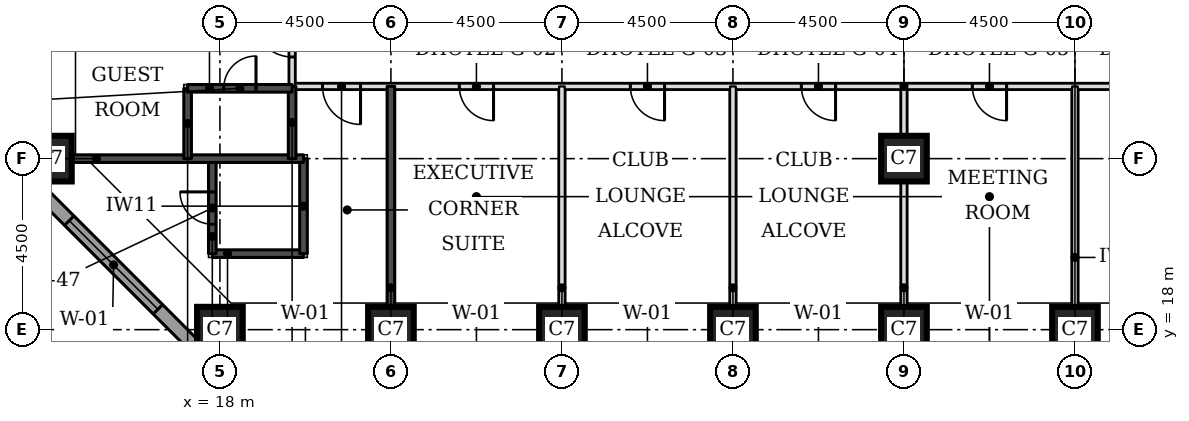
"""IFC4 building model, lengths in metres.
Left out: names, types, materials, properties, quantities, classifications, styles, units other than length and angle.
Written with IfcOpenShell. Run it as: python <this file> out.ifc"""

import sys

from ifc_helpers import new_model, si_unit, direction, frame, frame_2d, origin, origin_2d, place, context, subcontext, project, spatial, rectangle, extrude, element, fill, save


model = new_model("IFC4")
c1 = context("Model", 3, precision=1e-05, world=origin(), true_north=direction((0.0, 1.0)))
c2 = subcontext(c1, "Body", "Model", "MODEL_VIEW")
j1 = project(units=[si_unit("LENGTHUNIT", "METRE"), si_unit("PLANEANGLEUNIT", "RADIAN")], contexts=[c1])
p1 = place(None, origin())
s1 = spatial("IfcSite", under=j1, at=p1, CompositionType="ELEMENT")
p2 = place(p1, origin())
s2 = spatial("IfcBuilding", under=s1, at=p2, CompositionType="ELEMENT")
p3 = place(p2, frame((0.0, 0.0, 66.0)))
s3 = spatial("IfcBuildingStorey", under=s2, at=p3, CompositionType="ELEMENT", Elevation=66.0)
for number, where, z_axis, x_axis in (
    (1, (18.0, 18.0, 0.0), (0.0, 0.0, 1.0), (1.0, 0.0, 0.0)),
    (2, (22.5, 18.0, 0.0), (0.0, 0.0, 1.0), (1.0, 0.0, 0.0)),
    (3, (27.0, 18.0, 0.0), (0.0, 0.0, 1.0), (1.0, 0.0, 0.0)),
    (4, (31.5, 18.0, 0.0), (0.0, 0.0, 1.0), (1.0, 0.0, 0.0)),
    (5, (36.0, 18.0, 0.0), (0.0, 0.0, 1.0), (1.0, 0.0, 0.0)),
    (6, (40.5, 18.0, 0.0), (0.0, 0.0, 1.0), (1.0, 0.0, 0.0)),
    (7, (13.5, 22.5, 0.0), (0.0, 0.0, 1.0), (1.0, 0.0, 0.0)),
    (8, (36.0, 22.5, 0.0), (0.0, 0.0, 1.0), (1.0, 0.0, 0.0)),
):
    element("IfcColumn", number, at=place(p3, frame(where, z_axis=z_axis, x_axis=x_axis)), inside=s3, PredefinedType="COLUMN", context=c2, shape_type="SweptSolid", body=[
        extrude(rectangle(XDim=1.2, YDim=1.2, at=origin_2d()), origin(), (0.0, 0.0, 1.0), 3.3),
    ])
p4 = place(p3, frame((12.674, 22.23, 0.0), z_axis=(0.0, 0.0, 1.0), x_axis=(0.707106781187, -0.707106781187, 0.0)))
e9 = element("IfcWall", 9, at=p4, inside=s3, PredefinedType="STANDARD", context=c2, shape_type="SweptSolid", body=[
    extrude(rectangle(XDim=7.151, YDim=0.35, at=frame_2d((3.576, 0.0))), origin(), (0.0, 0.0, 1.0), 3.055),
])
p5 = place(p4, frame((1.926, 0.0, 0.8)))
e10 = element("IfcOpeningElement", 10, at=p5, cuts=e9, PredefinedType="OPENING", context=c2, shape_type="SweptSolid", body=[
    extrude(rectangle(XDim=3.3, YDim=1.5, at=frame_2d((1.65, 0.75))), frame((0.0, 0.185, 0.0), z_axis=(0.0, -1.0, 0.0), x_axis=(1.0, 0.0, 0.0)), (0.0, 0.0, 1.0), 0.37),
])
p6 = place(p3, frame((19.9, 24.4, 0.0), z_axis=(0.0, 0.0, 1.0), x_axis=(1.0, 0.0, 0.0)))
e11 = element("IfcWall", 11, at=p6, inside=s3, PredefinedType="PARTITIONING", context=c2, shape_type="SweptSolid", body=[
    extrude(rectangle(XDim=32.2, YDim=0.15, at=frame_2d((16.1, 0.0))), origin(), (0.0, 0.0, 1.0), 3.08),
])
p7 = place(p6, frame((4.4, 0.0, 0.0)))
e12 = element("IfcOpeningElement", 12, at=p7, cuts=e11, PredefinedType="OPENING", context=c2, shape_type="SweptSolid", body=[
    extrude(rectangle(XDim=0.9, YDim=2.1, at=frame_2d((0.45, 1.05))), frame((0.0, 0.085, 0.0), z_axis=(0.0, -1.0, 0.0), x_axis=(1.0, 0.0, 0.0)), (0.0, 0.0, 1.0), 0.17),
])
p8 = place(p6, frame((8.9, 0.0, 0.0)))
e13 = element("IfcOpeningElement", 13, at=p8, cuts=e11, PredefinedType="OPENING", context=c2, shape_type="SweptSolid", body=[
    extrude(rectangle(XDim=0.9, YDim=2.1, at=frame_2d((0.45, 1.05))), frame((0.0, 0.085, 0.0), z_axis=(0.0, -1.0, 0.0), x_axis=(1.0, 0.0, 0.0)), (0.0, 0.0, 1.0), 0.17),
])
p9 = place(p6, frame((13.4, 0.0, 0.0)))
e14 = element("IfcOpeningElement", 14, at=p9, cuts=e11, PredefinedType="OPENING", context=c2, shape_type="SweptSolid", body=[
    extrude(rectangle(XDim=0.9, YDim=2.1, at=frame_2d((0.45, 1.05))), frame((0.0, 0.085, 0.0), z_axis=(0.0, -1.0, 0.0), x_axis=(1.0, 0.0, 0.0)), (0.0, 0.0, 1.0), 0.17),
])
p10 = place(p6, frame((17.9, 0.0, 0.0)))
e15 = element("IfcOpeningElement", 15, at=p10, cuts=e11, PredefinedType="OPENING", context=c2, shape_type="SweptSolid", body=[
    extrude(rectangle(XDim=0.9, YDim=2.1, at=frame_2d((0.45, 1.05))), frame((0.0, 0.085, 0.0), z_axis=(0.0, -1.0, 0.0), x_axis=(1.0, 0.0, 0.0)), (0.0, 0.0, 1.0), 0.17),
])
p11 = place(p6, frame((22.4, 0.0, 0.0)))
e16 = element("IfcOpeningElement", 16, at=p11, cuts=e11, PredefinedType="OPENING", context=c2, shape_type="SweptSolid", body=[
    extrude(rectangle(XDim=0.9, YDim=2.1, at=frame_2d((0.45, 1.05))), frame((0.0, 0.085, 0.0), z_axis=(0.0, -1.0, 0.0), x_axis=(1.0, 0.0, 0.0)), (0.0, 0.0, 1.0), 0.17),
])
p12 = place(p6, frame((26.9, 0.0, 0.0)))
e17 = element("IfcOpeningElement", 17, at=p12, cuts=e11, PredefinedType="OPENING", context=c2, shape_type="SweptSolid", body=[
    extrude(rectangle(XDim=0.9, YDim=2.1, at=frame_2d((0.45, 1.05))), frame((0.0, 0.085, 0.0), z_axis=(0.0, -1.0, 0.0), x_axis=(1.0, 0.0, 0.0)), (0.0, 0.0, 1.0), 0.17),
])
p13 = place(p6, frame((0.8, 0.0, 0.0)))
e18 = element("IfcOpeningElement", 18, at=p13, cuts=e11, PredefinedType="OPENING", context=c2, shape_type="SweptSolid", body=[
    extrude(rectangle(XDim=1.0, YDim=2.1, at=frame_2d((0.5, 1.05))), frame((0.0, 0.085, 0.0), z_axis=(0.0, -1.0, 0.0), x_axis=(1.0, 0.0, 0.0)), (0.0, 0.0, 1.0), 0.17),
])
p14 = place(p6, frame((30.4, 0.0, 0.0)))
e19 = element("IfcOpeningElement", 19, at=p14, cuts=e11, PredefinedType="OPENING", context=c2, shape_type="SweptSolid", body=[
    extrude(rectangle(XDim=1.0, YDim=2.1, at=frame_2d((0.5, 1.05))), frame((0.0, 0.085, 0.0), z_axis=(0.0, -1.0, 0.0), x_axis=(1.0, 0.0, 0.0)), (0.0, 0.0, 1.0), 0.17),
])
p15 = place(p3, frame((19.9, 24.4, 0.0), z_axis=(0.0, 0.0, 1.0), x_axis=(0.0, 1.0, 0.0)))
e20 = element("IfcWall", 20, at=p15, inside=s3, PredefinedType="PARTITIONING", context=c2, shape_type="SweptSolid", body=[
    extrude(rectangle(XDim=25.1, YDim=0.15, at=frame_2d((12.55, 0.0))), origin(), (0.0, 0.0, 1.0), 3.08),
])
p16 = place(p15, frame((0.775, 0.0, 0.0)))
e21 = element("IfcOpeningElement", 21, at=p16, cuts=e20, PredefinedType="OPENING", context=c2, shape_type="SweptSolid", body=[
    extrude(rectangle(XDim=1.0, YDim=2.1, at=frame_2d((0.5, 1.05))), frame((0.0, 0.085, 0.0), z_axis=(0.0, -1.0, 0.0), x_axis=(1.0, 0.0, 0.0)), (0.0, 0.0, 1.0), 0.17),
])
p17 = place(p15, frame((3.175, 0.0, 0.0)))
e22 = element("IfcOpeningElement", 22, at=p17, cuts=e20, PredefinedType="OPENING", context=c2, shape_type="SweptSolid", body=[
    extrude(rectangle(XDim=1.0, YDim=2.1, at=frame_2d((0.5, 1.05))), frame((0.0, 0.085, 0.0), z_axis=(0.0, -1.0, 0.0), x_axis=(1.0, 0.0, 0.0)), (0.0, 0.0, 1.0), 0.17),
])
p18 = place(p15, frame((9.775, 0.0, 0.0)))
e23 = element("IfcOpeningElement", 23, at=p18, cuts=e20, PredefinedType="OPENING", context=c2, shape_type="SweptSolid", body=[
    extrude(rectangle(XDim=1.0, YDim=2.1, at=frame_2d((0.5, 1.05))), frame((0.0, 0.085, 0.0), z_axis=(0.0, -1.0, 0.0), x_axis=(1.0, 0.0, 0.0)), (0.0, 0.0, 1.0), 0.17),
])
p19 = place(p15, frame((12.175, 0.0, 0.0)))
e24 = element("IfcOpeningElement", 24, at=p19, cuts=e20, PredefinedType="OPENING", context=c2, shape_type="SweptSolid", body=[
    extrude(rectangle(XDim=1.0, YDim=2.1, at=frame_2d((0.5, 1.05))), frame((0.0, 0.085, 0.0), z_axis=(0.0, -1.0, 0.0), x_axis=(1.0, 0.0, 0.0)), (0.0, 0.0, 1.0), 0.17),
])
p20 = place(p15, frame((18.775, 0.0, 0.0)))
e25 = element("IfcOpeningElement", 25, at=p20, cuts=e20, PredefinedType="OPENING", context=c2, shape_type="SweptSolid", body=[
    extrude(rectangle(XDim=1.0, YDim=2.1, at=frame_2d((0.5, 1.05))), frame((0.0, 0.085, 0.0), z_axis=(0.0, -1.0, 0.0), x_axis=(1.0, 0.0, 0.0)), (0.0, 0.0, 1.0), 0.17),
])
p21 = place(p15, frame((21.175, 0.0, 0.0)))
e26 = element("IfcOpeningElement", 26, at=p21, cuts=e20, PredefinedType="OPENING", context=c2, shape_type="SweptSolid", body=[
    extrude(rectangle(XDim=1.0, YDim=2.1, at=frame_2d((0.5, 1.05))), frame((0.0, 0.085, 0.0), z_axis=(0.0, -1.0, 0.0), x_axis=(1.0, 0.0, 0.0)), (0.0, 0.0, 1.0), 0.17),
])
p22 = place(p3, frame((22.5, 18.6, 0.0), z_axis=(0.0, 0.0, 1.0), x_axis=(0.0, 1.0, 0.0)))
e27 = element("IfcWall", 27, at=p22, inside=s3, PredefinedType="SOLIDWALL", context=c2, shape_type="SweptSolid", body=[
    extrude(rectangle(XDim=5.8, YDim=0.2, at=frame_2d((2.9, 0.0))), origin(), (0.0, 0.0, 1.0), 3.08),
])
p23 = place(p3, frame((17.8, 20.0, 0.0), z_axis=(0.0, 0.0, 1.0), x_axis=(1.0, 0.0, 0.0)))
e28 = element("IfcWall", 28, at=p23, inside=s3, PredefinedType="SOLIDWALL", context=c2, shape_type="SweptSolid", body=[
    extrude(rectangle(XDim=2.4, YDim=0.2, at=frame_2d((1.2, 0.0))), origin(), (0.0, 0.0, 1.0), 3.08),
])
p24 = place(p3, frame((17.8, 20.0, 0.0), z_axis=(0.0, 0.0, 1.0), x_axis=(0.0, 1.0, 0.0)))
e29 = element("IfcWall", 29, at=p24, inside=s3, PredefinedType="SOLIDWALL", context=c2, shape_type="SweptSolid", body=[
    extrude(rectangle(XDim=2.5, YDim=0.2, at=frame_2d((1.25, 0.0))), origin(), (0.0, 0.0, 1.0), 3.08),
])
p25 = place(p24, frame((0.775, 0.0, 0.0)))
e30 = element("IfcOpeningElement", 30, at=p25, cuts=e29, PredefinedType="OPENING", context=c2, shape_type="SweptSolid", body=[
    extrude(rectangle(XDim=0.85, YDim=2.1, at=frame_2d((0.425, 1.05))), frame((0.0, 0.11, 0.0), z_axis=(0.0, -1.0, 0.0), x_axis=(1.0, 0.0, 0.0)), (0.0, 0.0, 1.0), 0.22),
])
p26 = place(p3, frame((20.2, 20.0, 0.0), z_axis=(0.0, 0.0, 1.0), x_axis=(0.0, 1.0, 0.0)))
e31 = element("IfcWall", 31, at=p26, inside=s3, PredefinedType="SOLIDWALL", context=c2, shape_type="SweptSolid", body=[
    extrude(rectangle(XDim=2.5, YDim=0.2, at=frame_2d((1.25, 0.0))), origin(), (0.0, 0.0, 1.0), 3.08),
])
p27 = place(p3, frame((14.1, 22.5, 0.0), z_axis=(0.0, 0.0, 1.0), x_axis=(1.0, 0.0, 0.0)))
e32 = element("IfcWall", 32, at=p27, inside=s3, PredefinedType="SOLIDWALL", context=c2, shape_type="SweptSolid", body=[
    extrude(rectangle(XDim=6.1, YDim=0.2, at=frame_2d((3.05, 0.0))), origin(), (0.0, 0.0, 1.0), 3.08),
])
p28 = place(p3, frame((17.15, 22.5, 0.0), z_axis=(0.0, 0.0, 1.0), x_axis=(0.0, 1.0, 0.0)))
e33 = element("IfcWall", 33, at=p28, inside=s3, PredefinedType="SOLIDWALL", context=c2, shape_type="SweptSolid", body=[
    extrude(rectangle(XDim=1.85, YDim=0.2, at=frame_2d((0.925, 0.0))), origin(), (0.0, 0.0, 1.0), 3.08),
])
p29 = place(p3, frame((19.9, 22.5, 0.0), z_axis=(0.0, 0.0, 1.0), x_axis=(0.0, 1.0, 0.0)))
e34 = element("IfcWall", 34, at=p29, inside=s3, PredefinedType="SOLIDWALL", context=c2, shape_type="SweptSolid", body=[
    extrude(rectangle(XDim=1.9, YDim=0.2, at=frame_2d((0.95, 0.0))), origin(), (0.0, 0.0, 1.0), 3.08),
])
p30 = place(p3, frame((17.15, 24.35, 0.0), z_axis=(0.0, 0.0, 1.0), x_axis=(1.0, 0.0, 0.0)))
e35 = element("IfcWall", 35, at=p30, inside=s3, PredefinedType="SOLIDWALL", context=c2, shape_type="SweptSolid", body=[
    extrude(rectangle(XDim=2.75, YDim=0.2, at=frame_2d((1.375, 0.0))), origin(), (0.0, 0.0, 1.0), 3.08),
])
p31 = place(p30, frame((0.95, 0.0, 0.0)))
e36 = element("IfcOpeningElement", 36, at=p31, cuts=e35, PredefinedType="OPENING", context=c2, shape_type="SweptSolid", body=[
    extrude(rectangle(XDim=0.85, YDim=2.1, at=frame_2d((0.425, 1.05))), frame((0.0, 0.11, 0.0), z_axis=(0.0, -1.0, 0.0), x_axis=(1.0, 0.0, 0.0)), (0.0, 0.0, 1.0), 0.22),
])
for number, where, z_axis, x_axis in (
    (37, (27.0, 18.6, 0.0), (0.0, 0.0, 1.0), (0.0, 1.0, 0.0)),
    (38, (31.5, 18.6, 0.0), (0.0, 0.0, 1.0), (0.0, 1.0, 0.0)),
):
    element("IfcWall", number, at=place(p3, frame(where, z_axis=z_axis, x_axis=x_axis)), inside=s3, PredefinedType="PARTITIONING", context=c2, shape_type="SweptSolid", body=[
        extrude(rectangle(XDim=5.8, YDim=0.15, at=frame_2d((2.9, 0.0))), origin(), (0.0, 0.0, 1.0), 3.08),
    ])
p32 = place(p3, frame((36.0, 18.6, 0.0), z_axis=(0.0, 0.0, 1.0), x_axis=(0.0, 1.0, 0.0)))
e39 = element("IfcWall", 39, at=p32, inside=s3, PredefinedType="PARTITIONING", context=c2, shape_type="SweptSolid", body=[
    extrude(rectangle(XDim=5.8, YDim=0.15, at=frame_2d((2.9, 0.0))), origin(), (0.0, 0.0, 1.0), 2.33),
])
p33 = place(p3, frame((40.5, 18.6, 0.0), z_axis=(0.0, 0.0, 1.0), x_axis=(0.0, 1.0, 0.0)))
e40 = element("IfcWall", 40, at=p33, inside=s3, PredefinedType="PARTITIONING", context=c2, shape_type="SweptSolid", body=[
    extrude(rectangle(XDim=5.8, YDim=0.15, at=frame_2d((2.9, 0.0))), origin(), (0.0, 0.0, 1.0), 3.08),
])
p34 = place(p5, origin())
e41 = element("IfcWindow", 41, at=p34, inside=s3, PartitioningType="SINGLE_PANEL", PredefinedType="WINDOW", context=c2, shape_type="SweptSolid", body=[
    extrude(rectangle(XDim=3.3, YDim=1.5, at=frame_2d((1.65, 0.75))), frame((0.0, 0.085, 0.0), z_axis=(0.0, -1.0, 0.0), x_axis=(1.0, 0.0, 0.0)), (0.0, 0.0, 1.0), 0.06),
])
fill(e10, e41)
p35 = place(p7, frame((0.9, 0.0, 0.0), z_axis=(0.0, 0.0, 1.0), x_axis=(-1.0, 0.0, 0.0)))
e42 = element("IfcDoor", 42, at=p35, inside=s3, OperationType="SINGLE_SWING_LEFT", PredefinedType="DOOR", context=c2, shape_type="SweptSolid", body=[
    extrude(rectangle(XDim=0.9, YDim=2.1, at=frame_2d((0.45, 1.05))), frame((0.0, 0.025, 0.0), z_axis=(0.0, -1.0, 0.0), x_axis=(1.0, 0.0, 0.0)), (0.0, 0.0, 1.0), 0.05),
])
fill(e12, e42)
p36 = place(p8, frame((0.9, 0.0, 0.0), z_axis=(0.0, 0.0, 1.0), x_axis=(-1.0, 0.0, 0.0)))
e43 = element("IfcDoor", 43, at=p36, inside=s3, OperationType="SINGLE_SWING_LEFT", PredefinedType="DOOR", context=c2, shape_type="SweptSolid", body=[
    extrude(rectangle(XDim=0.9, YDim=2.1, at=frame_2d((0.45, 1.05))), frame((0.0, 0.025, 0.0), z_axis=(0.0, -1.0, 0.0), x_axis=(1.0, 0.0, 0.0)), (0.0, 0.0, 1.0), 0.05),
])
fill(e13, e43)
p37 = place(p9, frame((0.9, 0.0, 0.0), z_axis=(0.0, 0.0, 1.0), x_axis=(-1.0, 0.0, 0.0)))
e44 = element("IfcDoor", 44, at=p37, inside=s3, OperationType="SINGLE_SWING_LEFT", PredefinedType="DOOR", context=c2, shape_type="SweptSolid", body=[
    extrude(rectangle(XDim=0.9, YDim=2.1, at=frame_2d((0.45, 1.05))), frame((0.0, 0.025, 0.0), z_axis=(0.0, -1.0, 0.0), x_axis=(1.0, 0.0, 0.0)), (0.0, 0.0, 1.0), 0.05),
])
fill(e14, e44)
p38 = place(p10, frame((0.9, 0.0, 0.0), z_axis=(0.0, 0.0, 1.0), x_axis=(-1.0, 0.0, 0.0)))
e45 = element("IfcDoor", 45, at=p38, inside=s3, OperationType="SINGLE_SWING_LEFT", PredefinedType="DOOR", context=c2, shape_type="SweptSolid", body=[
    extrude(rectangle(XDim=0.9, YDim=2.1, at=frame_2d((0.45, 1.05))), frame((0.0, 0.025, 0.0), z_axis=(0.0, -1.0, 0.0), x_axis=(1.0, 0.0, 0.0)), (0.0, 0.0, 1.0), 0.05),
])
fill(e15, e45)
p39 = place(p16, origin())
e46 = element("IfcDoor", 46, at=p39, inside=s3, OperationType="SINGLE_SWING_RIGHT", PredefinedType="DOOR", context=c2, shape_type="SweptSolid", body=[
    extrude(rectangle(XDim=1.0, YDim=2.1, at=frame_2d((0.5, 1.05))), frame((0.0, 0.025, 0.0), z_axis=(0.0, -1.0, 0.0), x_axis=(1.0, 0.0, 0.0)), (0.0, 0.0, 1.0), 0.05),
])
fill(e21, e46)
p40 = place(p31, origin())
e47 = element("IfcDoor", 47, at=p40, inside=s3, OperationType="SINGLE_SWING_RIGHT", PredefinedType="DOOR", context=c2, shape_type="SweptSolid", body=[
    extrude(rectangle(XDim=0.85, YDim=2.1, at=frame_2d((0.425, 1.05))), frame((0.0, 0.025, 0.0), z_axis=(0.0, -1.0, 0.0), x_axis=(1.0, 0.0, 0.0)), (0.0, 0.0, 1.0), 0.05),
])
fill(e36, e47)
p41 = place(p13, frame((1.0, 0.0, 0.0), z_axis=(0.0, 0.0, 1.0), x_axis=(-1.0, 0.0, 0.0)))
e48 = element("IfcDoor", 48, at=p41, inside=s3, OperationType="SINGLE_SWING_LEFT", PredefinedType="DOOR", context=c2, shape_type="SweptSolid", body=[
    extrude(rectangle(XDim=1.0, YDim=2.1, at=frame_2d((0.5, 1.05))), frame((0.0, 0.025, 0.0), z_axis=(0.0, -1.0, 0.0), x_axis=(1.0, 0.0, 0.0)), (0.0, 0.0, 1.0), 0.05),
])
fill(e18, e48)
p42 = place(p25, origin())
e49 = element("IfcDoor", 49, at=p42, inside=s3, OperationType="SINGLE_SWING_RIGHT", PredefinedType="DOOR", context=c2, shape_type="SweptSolid", body=[
    extrude(rectangle(XDim=0.85, YDim=2.1, at=frame_2d((0.425, 1.05))), frame((0.0, 0.025, 0.0), z_axis=(0.0, -1.0, 0.0), x_axis=(1.0, 0.0, 0.0)), (0.0, 0.0, 1.0), 0.05),
])
fill(e30, e49)
save(model, sys.argv[1])
